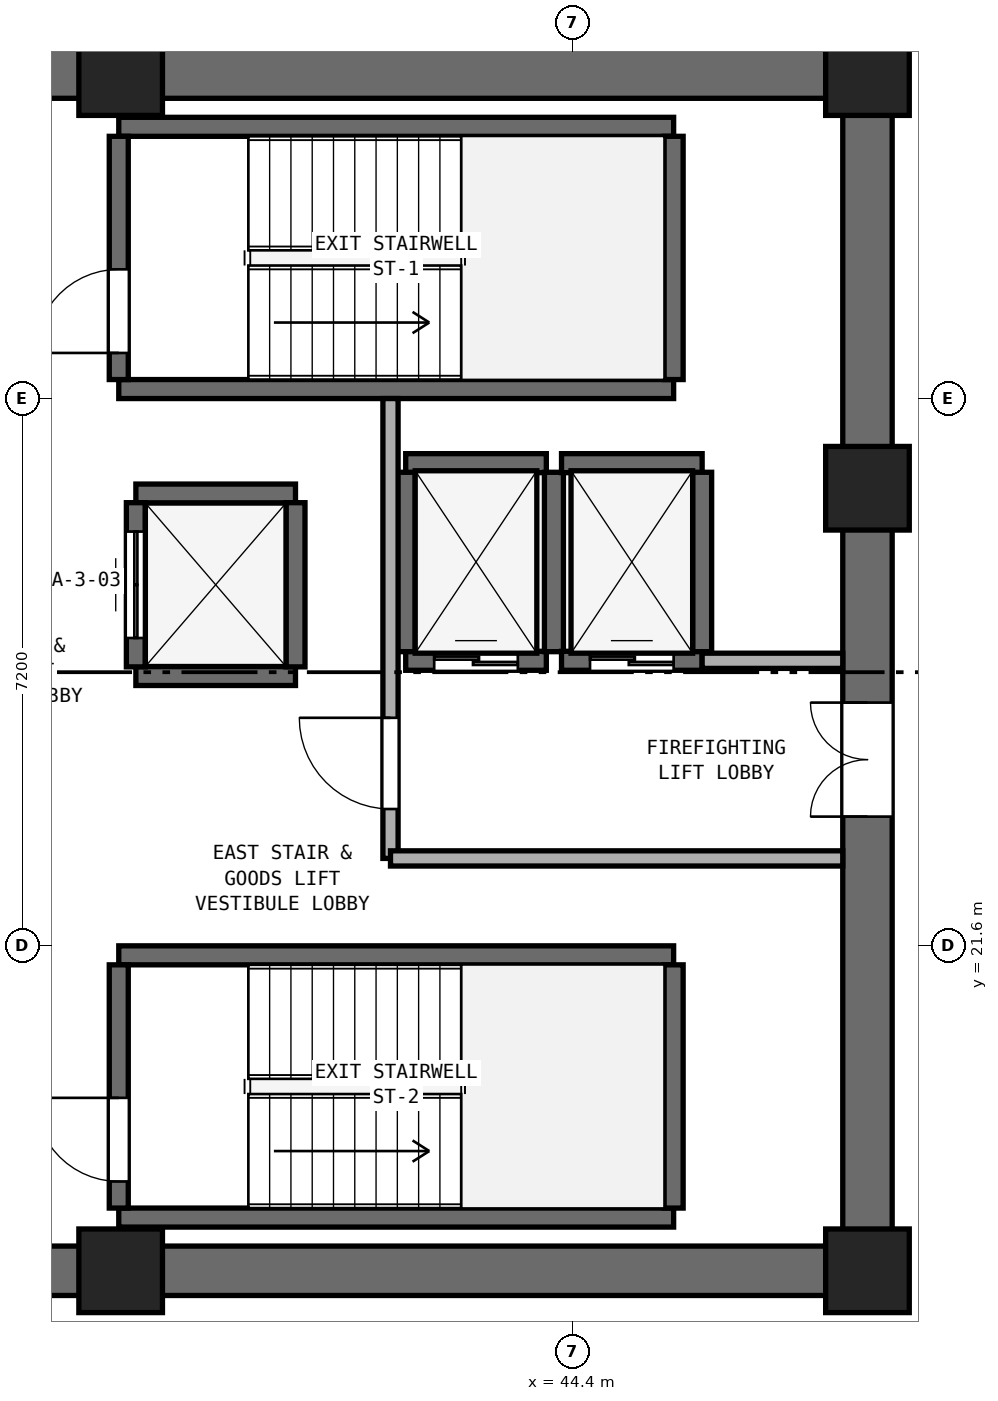
"""IFC4 building model, lengths in metres.
Left out: names, types, materials, properties, quantities, classifications, styles, units other than length and angle.
Written with IfcOpenShell. Run it as: python <this file> out.ifc"""

import sys

from ifc_helpers import new_model, si_unit, direction, frame, frame_2d, origin, origin_2d, place, context, subcontext, project, spatial, rectangle, extrude, element, fill, save


model = new_model("IFC4")
c1 = context("Model", 3, precision=1e-05, world=origin(), true_north=direction((0.0, 1.0)))
c2 = subcontext(c1, "Body", "Model", "MODEL_VIEW")
j1 = project(units=[si_unit("LENGTHUNIT", "METRE"), si_unit("PLANEANGLEUNIT", "RADIAN")], contexts=[c1])
p1 = place(None, origin())
s1 = spatial("IfcSite", under=j1, at=p1, CompositionType="ELEMENT")
p2 = place(p1, origin())
s2 = spatial("IfcBuilding", under=s1, at=p2, CompositionType="ELEMENT")
p3 = place(p2, frame((0.0, 0.0, 97.2)))
s3 = spatial("IfcBuildingStorey", under=s2, at=p3, CompositionType="ELEMENT", Elevation=97.2)
for number, where, z_axis, x_axis in (
    (1, (25.4, 17.325, 0.0), (0.0, 0.0, 1.0), (1.0, 0.0, 0.0)),
    (2, (25.4, 33.075, 0.0), (0.0, 0.0, 1.0), (1.0, 0.0, 0.0)),
):
    element("IfcWall", number, at=place(p3, frame(where, z_axis=z_axis, x_axis=x_axis)), inside=s3, PredefinedType="SHEAR", context=c2, shape_type="SweptSolid", body=[
        extrude(rectangle(XDim=23.2, YDim=0.65, at=frame_2d((11.6, 0.0))), origin(), (0.0, 0.0, 1.0), 3.525),
    ])
p4 = place(p3, frame((48.275, 17.65, 0.0), z_axis=(0.0, 0.0, 1.0), x_axis=(0.0, 1.0, 0.0)))
e3 = element("IfcWall", 3, at=p4, inside=s3, PredefinedType="SHEAR", context=c2, shape_type="SweptSolid", body=[
    extrude(rectangle(XDim=15.1, YDim=0.65, at=frame_2d((7.55, 0.0))), origin(), (0.0, 0.0, 1.0), 3.525),
])
p5 = place(p4, frame((5.65, 0.0, 0.0)))
e4 = element("IfcOpeningElement", 4, at=p5, cuts=e3, PredefinedType="OPENING", context=c2, shape_type="SweptSolid", body=[
    extrude(rectangle(XDim=1.5, YDim=2.15, at=frame_2d((0.75, 1.075))), frame((0.0, 0.335, 0.0), z_axis=(0.0, -1.0, 0.0), x_axis=(1.0, 0.0, 0.0)), (0.0, 0.0, 1.0), 0.67),
])
for number, where, z_axis, x_axis in (
    (5, (38.45, 17.325, 0.0), (0.0, 0.0, 1.0), (1.0, 0.0, 0.0)),
    (6, (48.275, 17.325, 0.0), (0.0, 0.0, 1.0), (1.0, 0.0, 0.0)),
    (7, (48.275, 27.62, 0.0), (0.0, 0.0, 1.0), (1.0, 0.0, 0.0)),
    (8, (48.275, 33.075, 0.0), (0.0, 0.0, 1.0), (1.0, 0.0, 0.0)),
    (9, (38.45, 33.075, 0.0), (0.0, 0.0, 1.0), (1.0, 0.0, 0.0)),
):
    element("IfcColumn", number, at=place(p3, frame(where, z_axis=z_axis, x_axis=x_axis)), inside=s3, PredefinedType="PILASTER", context=c2, shape_type="SweptSolid", body=[
        extrude(rectangle(XDim=1.1, YDim=1.1, at=origin_2d()), origin(), (0.0, 0.0, 1.0), 3.8),
    ])
for number, where, z_axis, x_axis in (
    (10, (38.425, 28.925, 0.0), (0.0, 0.0, 1.0), (1.0, 0.0, 0.0)),
    (11, (38.425, 32.375, 0.0), (0.0, 0.0, 1.0), (1.0, 0.0, 0.0)),
):
    element("IfcWall", number, at=place(p3, frame(where, z_axis=z_axis, x_axis=x_axis)), inside=s3, PredefinedType="SHEAR", context=c2, shape_type="SweptSolid", body=[
        extrude(rectangle(XDim=7.3, YDim=0.25, at=frame_2d((3.65, 0.0))), origin(), (0.0, 0.0, 1.0), 3.525),
    ])
p6 = place(p3, frame((38.425, 29.05, 0.0), z_axis=(0.0, 0.0, 1.0), x_axis=(0.0, 1.0, 0.0)))
e12 = element("IfcWall", 12, at=p6, inside=s3, PredefinedType="SHEAR", context=c2, shape_type="SweptSolid", body=[
    extrude(rectangle(XDim=3.2, YDim=0.25, at=frame_2d((1.6, 0.0))), origin(), (0.0, 0.0, 1.0), 3.525),
])
p7 = place(p6, frame((0.35, 0.0, 0.0)))
e13 = element("IfcOpeningElement", 13, at=p7, cuts=e12, PredefinedType="OPENING", context=c2, shape_type="SweptSolid", body=[
    extrude(rectangle(XDim=1.1, YDim=2.15, at=frame_2d((0.55, 1.075))), frame((0.0, 0.135, 0.0), z_axis=(0.0, -1.0, 0.0), x_axis=(1.0, 0.0, 0.0)), (0.0, 0.0, 1.0), 0.27),
])
p8 = place(p3, frame((45.725, 29.05, 0.0), z_axis=(0.0, 0.0, 1.0), x_axis=(0.0, 1.0, 0.0)))
e14 = element("IfcWall", 14, at=p8, inside=s3, PredefinedType="SHEAR", context=c2, shape_type="SweptSolid", body=[
    extrude(rectangle(XDim=3.2, YDim=0.25, at=frame_2d((1.6, 0.0))), origin(), (0.0, 0.0, 1.0), 3.525),
])
for number, where, z_axis, x_axis in (
    (15, (38.425, 18.025, 0.0), (0.0, 0.0, 1.0), (1.0, 0.0, 0.0)),
    (16, (38.425, 21.475, 0.0), (0.0, 0.0, 1.0), (1.0, 0.0, 0.0)),
):
    element("IfcWall", number, at=place(p3, frame(where, z_axis=z_axis, x_axis=x_axis)), inside=s3, PredefinedType="SHEAR", context=c2, shape_type="SweptSolid", body=[
        extrude(rectangle(XDim=7.3, YDim=0.25, at=frame_2d((3.65, 0.0))), origin(), (0.0, 0.0, 1.0), 3.525),
    ])
p9 = place(p3, frame((38.425, 18.15, 0.0), z_axis=(0.0, 0.0, 1.0), x_axis=(0.0, 1.0, 0.0)))
e17 = element("IfcWall", 17, at=p9, inside=s3, PredefinedType="SHEAR", context=c2, shape_type="SweptSolid", body=[
    extrude(rectangle(XDim=3.2, YDim=0.25, at=frame_2d((1.6, 0.0))), origin(), (0.0, 0.0, 1.0), 3.525),
])
p10 = place(p9, frame((0.35, 0.0, 0.0)))
e18 = element("IfcOpeningElement", 18, at=p10, cuts=e17, PredefinedType="OPENING", context=c2, shape_type="SweptSolid", body=[
    extrude(rectangle(XDim=1.1, YDim=2.15, at=frame_2d((0.55, 1.075))), frame((0.0, 0.135, 0.0), z_axis=(0.0, -1.0, 0.0), x_axis=(1.0, 0.0, 0.0)), (0.0, 0.0, 1.0), 0.27),
])
p11 = place(p3, frame((45.725, 18.15, 0.0), z_axis=(0.0, 0.0, 1.0), x_axis=(0.0, 1.0, 0.0)))
e19 = element("IfcWall", 19, at=p11, inside=s3, PredefinedType="SHEAR", context=c2, shape_type="SweptSolid", body=[
    extrude(rectangle(XDim=3.2, YDim=0.25, at=frame_2d((1.6, 0.0))), origin(), (0.0, 0.0, 1.0), 3.525),
])
p12 = place(p3, frame((42.2, 25.35, 0.0), z_axis=(0.0, 0.0, 1.0), x_axis=(1.0, 0.0, 0.0)))
e20 = element("IfcWall", 20, at=p12, inside=s3, PredefinedType="SHEAR", context=c2, shape_type="SweptSolid", body=[
    extrude(rectangle(XDim=1.85, YDim=0.25, at=frame_2d((0.925, 0.0))), origin(), (0.0, 0.0, 1.0), 3.525),
])
p13 = place(p12, frame((0.375, 0.0, 0.0)))
e21 = element("IfcOpeningElement", 21, at=p13, cuts=e20, PredefinedType="OPENING", context=c2, shape_type="SweptSolid", body=[
    extrude(rectangle(XDim=1.1, YDim=2.15, at=frame_2d((0.55, 1.075))), frame((0.0, 0.135, 0.0), z_axis=(0.0, -1.0, 0.0), x_axis=(1.0, 0.0, 0.0)), (0.0, 0.0, 1.0), 0.27),
])
p14 = place(p3, frame((42.2, 27.95, 0.0), z_axis=(0.0, 0.0, 1.0), x_axis=(1.0, 0.0, 0.0)))
e22 = element("IfcWall", 22, at=p14, inside=s3, PredefinedType="SHEAR", context=c2, shape_type="SweptSolid", body=[
    extrude(rectangle(XDim=1.85, YDim=0.25, at=frame_2d((0.925, 0.0))), origin(), (0.0, 0.0, 1.0), 3.525),
])
for number, where, z_axis, x_axis in (
    (23, (42.2, 25.47, 0.0), (0.0, 0.0, 1.0), (0.0, 1.0, 0.0)),
    (24, (44.15, 25.47, 0.0), (0.0, 0.0, 1.0), (0.0, 1.0, 0.0)),
):
    element("IfcWall", number, at=place(p3, frame(where, z_axis=z_axis, x_axis=x_axis)), inside=s3, PredefinedType="SHEAR", context=c2, shape_type="SweptSolid", body=[
        extrude(rectangle(XDim=2.36, YDim=0.25, at=frame_2d((1.18, 0.0))), origin(), (0.0, 0.0, 1.0), 3.525),
    ])
p15 = place(p3, frame((44.25, 25.35, 0.0), z_axis=(0.0, 0.0, 1.0), x_axis=(1.0, 0.0, 0.0)))
e25 = element("IfcWall", 25, at=p15, inside=s3, PredefinedType="SHEAR", context=c2, shape_type="SweptSolid", body=[
    extrude(rectangle(XDim=1.85, YDim=0.25, at=frame_2d((0.925, 0.0))), origin(), (0.0, 0.0, 1.0), 3.525),
])
p16 = place(p15, frame((0.375, 0.0, 0.0)))
e26 = element("IfcOpeningElement", 26, at=p16, cuts=e25, PredefinedType="OPENING", context=c2, shape_type="SweptSolid", body=[
    extrude(rectangle(XDim=1.1, YDim=2.15, at=frame_2d((0.55, 1.075))), frame((0.0, 0.135, 0.0), z_axis=(0.0, -1.0, 0.0), x_axis=(1.0, 0.0, 0.0)), (0.0, 0.0, 1.0), 0.27),
])
p17 = place(p3, frame((44.25, 27.95, 0.0), z_axis=(0.0, 0.0, 1.0), x_axis=(1.0, 0.0, 0.0)))
e27 = element("IfcWall", 27, at=p17, inside=s3, PredefinedType="SHEAR", context=c2, shape_type="SweptSolid", body=[
    extrude(rectangle(XDim=1.85, YDim=0.25, at=frame_2d((0.925, 0.0))), origin(), (0.0, 0.0, 1.0), 3.525),
])
p18 = place(p3, frame((46.1, 25.47, 0.0), z_axis=(0.0, 0.0, 1.0), x_axis=(0.0, 1.0, 0.0)))
e28 = element("IfcWall", 28, at=p18, inside=s3, PredefinedType="SHEAR", context=c2, shape_type="SweptSolid", body=[
    extrude(rectangle(XDim=2.36, YDim=0.25, at=frame_2d((1.18, 0.0))), origin(), (0.0, 0.0, 1.0), 3.525),
])
for number, where, z_axis, x_axis in (
    (29, (38.65, 25.15, 0.0), (0.0, 0.0, 1.0), (1.0, 0.0, 0.0)),
    (30, (38.65, 27.55, 0.0), (0.0, 0.0, 1.0), (1.0, 0.0, 0.0)),
):
    element("IfcWall", number, at=place(p3, frame(where, z_axis=z_axis, x_axis=x_axis)), inside=s3, PredefinedType="SHEAR", context=c2, shape_type="SweptSolid", body=[
        extrude(rectangle(XDim=2.1, YDim=0.25, at=frame_2d((1.05, 0.0))), origin(), (0.0, 0.0, 1.0), 3.525),
    ])
p19 = place(p3, frame((38.65, 25.27, 0.0), z_axis=(0.0, 0.0, 1.0), x_axis=(0.0, 1.0, 0.0)))
e31 = element("IfcWall", 31, at=p19, inside=s3, PredefinedType="SHEAR", context=c2, shape_type="SweptSolid", body=[
    extrude(rectangle(XDim=2.16, YDim=0.25, at=frame_2d((1.08, 0.0))), origin(), (0.0, 0.0, 1.0), 3.525),
])
p20 = place(p19, frame((0.38, 0.0, 0.0)))
e32 = element("IfcOpeningElement", 32, at=p20, cuts=e31, PredefinedType="OPENING", context=c2, shape_type="SweptSolid", body=[
    extrude(rectangle(XDim=1.4, YDim=2.2, at=frame_2d((0.7, 1.1))), frame((0.0, 0.135, 0.0), z_axis=(0.0, -1.0, 0.0), x_axis=(1.0, 0.0, 0.0)), (0.0, 0.0, 1.0), 0.27),
])
p21 = place(p3, frame((40.75, 25.27, 0.0), z_axis=(0.0, 0.0, 1.0), x_axis=(0.0, 1.0, 0.0)))
e33 = element("IfcWall", 33, at=p21, inside=s3, PredefinedType="SHEAR", context=c2, shape_type="SweptSolid", body=[
    extrude(rectangle(XDim=2.16, YDim=0.25, at=frame_2d((1.08, 0.0))), origin(), (0.0, 0.0, 1.0), 3.525),
])
p22 = place(p3, frame((42.0, 22.75, 0.0), z_axis=(0.0, 0.0, 1.0), x_axis=(0.0, 1.0, 0.0)))
e34 = element("IfcWall", 34, at=p22, inside=s3, PredefinedType="SOLIDWALL", context=c2, shape_type="SweptSolid", body=[
    extrude(rectangle(XDim=6.05, YDim=0.2, at=frame_2d((3.025, 0.0))), origin(), (0.0, 0.0, 1.0), 3.525),
])
p23 = place(p22, frame((0.65, 0.0, 0.0)))
e35 = element("IfcOpeningElement", 35, at=p23, cuts=e34, PredefinedType="OPENING", context=c2, shape_type="SweptSolid", body=[
    extrude(rectangle(XDim=1.2, YDim=2.15, at=frame_2d((0.6, 1.075))), frame((0.0, 0.11, 0.0), z_axis=(0.0, -1.0, 0.0), x_axis=(1.0, 0.0, 0.0)), (0.0, 0.0, 1.0), 0.22),
])
p24 = place(p3, frame((42.0, 22.75, 0.0), z_axis=(0.0, 0.0, 1.0), x_axis=(1.0, 0.0, 0.0)))
e36 = element("IfcWall", 36, at=p24, inside=s3, PredefinedType="SOLIDWALL", context=c2, shape_type="SweptSolid", body=[
    extrude(rectangle(XDim=5.95, YDim=0.2, at=frame_2d((2.975, 0.0))), origin(), (0.0, 0.0, 1.0), 3.525),
])
p25 = place(p3, frame((46.1, 25.35, 0.0), z_axis=(0.0, 0.0, 1.0), x_axis=(1.0, 0.0, 0.0)))
e37 = element("IfcWall", 37, at=p25, inside=s3, PredefinedType="SOLIDWALL", context=c2, shape_type="SweptSolid", body=[
    extrude(rectangle(XDim=1.85, YDim=0.2, at=frame_2d((0.925, 0.0))), origin(), (0.0, 0.0, 1.0), 3.525),
])
p26 = place(p7, origin())
e38 = element("IfcDoor", 38, at=p26, inside=s3, OperationType="SINGLE_SWING_LEFT", PredefinedType="DOOR", context=c2, shape_type="SweptSolid", body=[
    extrude(rectangle(XDim=1.1, YDim=2.15, at=frame_2d((0.55, 1.075))), frame((0.0, 0.025, 0.0), z_axis=(0.0, -1.0, 0.0), x_axis=(1.0, 0.0, 0.0)), (0.0, 0.0, 1.0), 0.05),
])
fill(e13, e38)
p27 = place(p10, origin())
e39 = element("IfcDoor", 39, at=p27, inside=s3, OperationType="SINGLE_SWING_RIGHT", PredefinedType="DOOR", context=c2, shape_type="SweptSolid", body=[
    extrude(rectangle(XDim=1.1, YDim=2.15, at=frame_2d((0.55, 1.075))), frame((0.0, 0.025, 0.0), z_axis=(0.0, -1.0, 0.0), x_axis=(1.0, 0.0, 0.0)), (0.0, 0.0, 1.0), 0.05),
])
fill(e18, e39)
p28 = place(p13, origin())
e40 = element("IfcDoor", 40, at=p28, inside=s3, OperationType="DOUBLE_DOOR_SLIDING", PredefinedType="DOOR", context=c2, shape_type="SweptSolid", body=[
    extrude(rectangle(XDim=1.1, YDim=2.15, at=frame_2d((0.55, 1.075))), frame((0.0, 0.025, 0.0), z_axis=(0.0, -1.0, 0.0), x_axis=(1.0, 0.0, 0.0)), (0.0, 0.0, 1.0), 0.05),
])
fill(e21, e40)
p29 = place(p16, origin())
e41 = element("IfcDoor", 41, at=p29, inside=s3, OperationType="DOUBLE_DOOR_SLIDING", PredefinedType="DOOR", context=c2, shape_type="SweptSolid", body=[
    extrude(rectangle(XDim=1.1, YDim=2.15, at=frame_2d((0.55, 1.075))), frame((0.0, 0.025, 0.0), z_axis=(0.0, -1.0, 0.0), x_axis=(1.0, 0.0, 0.0)), (0.0, 0.0, 1.0), 0.05),
])
fill(e26, e41)
p30 = place(p20, origin())
e42 = element("IfcDoor", 42, at=p30, inside=s3, OperationType="DOUBLE_DOOR_SLIDING", PredefinedType="DOOR", context=c2, shape_type="SweptSolid", body=[
    extrude(rectangle(XDim=1.4, YDim=2.2, at=frame_2d((0.7, 1.1))), frame((0.0, 0.025, 0.0), z_axis=(0.0, -1.0, 0.0), x_axis=(1.0, 0.0, 0.0)), (0.0, 0.0, 1.0), 0.05),
])
fill(e32, e42)
p31 = place(p23, origin())
e43 = element("IfcDoor", 43, at=p31, inside=s3, OperationType="SINGLE_SWING_RIGHT", PredefinedType="DOOR", context=c2, shape_type="SweptSolid", body=[
    extrude(rectangle(XDim=1.2, YDim=2.15, at=frame_2d((0.6, 1.075))), frame((0.0, 0.025, 0.0), z_axis=(0.0, -1.0, 0.0), x_axis=(1.0, 0.0, 0.0)), (0.0, 0.0, 1.0), 0.05),
])
fill(e35, e43)
p32 = place(p5, origin())
e44 = element("IfcDoor", 44, at=p32, inside=s3, OperationType="DOUBLE_DOOR_SINGLE_SWING", PredefinedType="DOOR", context=c2, shape_type="SweptSolid", body=[
    extrude(rectangle(XDim=1.5, YDim=2.15, at=frame_2d((0.75, 1.075))), frame((0.0, 0.025, 0.0), z_axis=(0.0, -1.0, 0.0), x_axis=(1.0, 0.0, 0.0)), (0.0, 0.0, 1.0), 0.05),
])
fill(e4, e44)
save(model, sys.argv[1])
